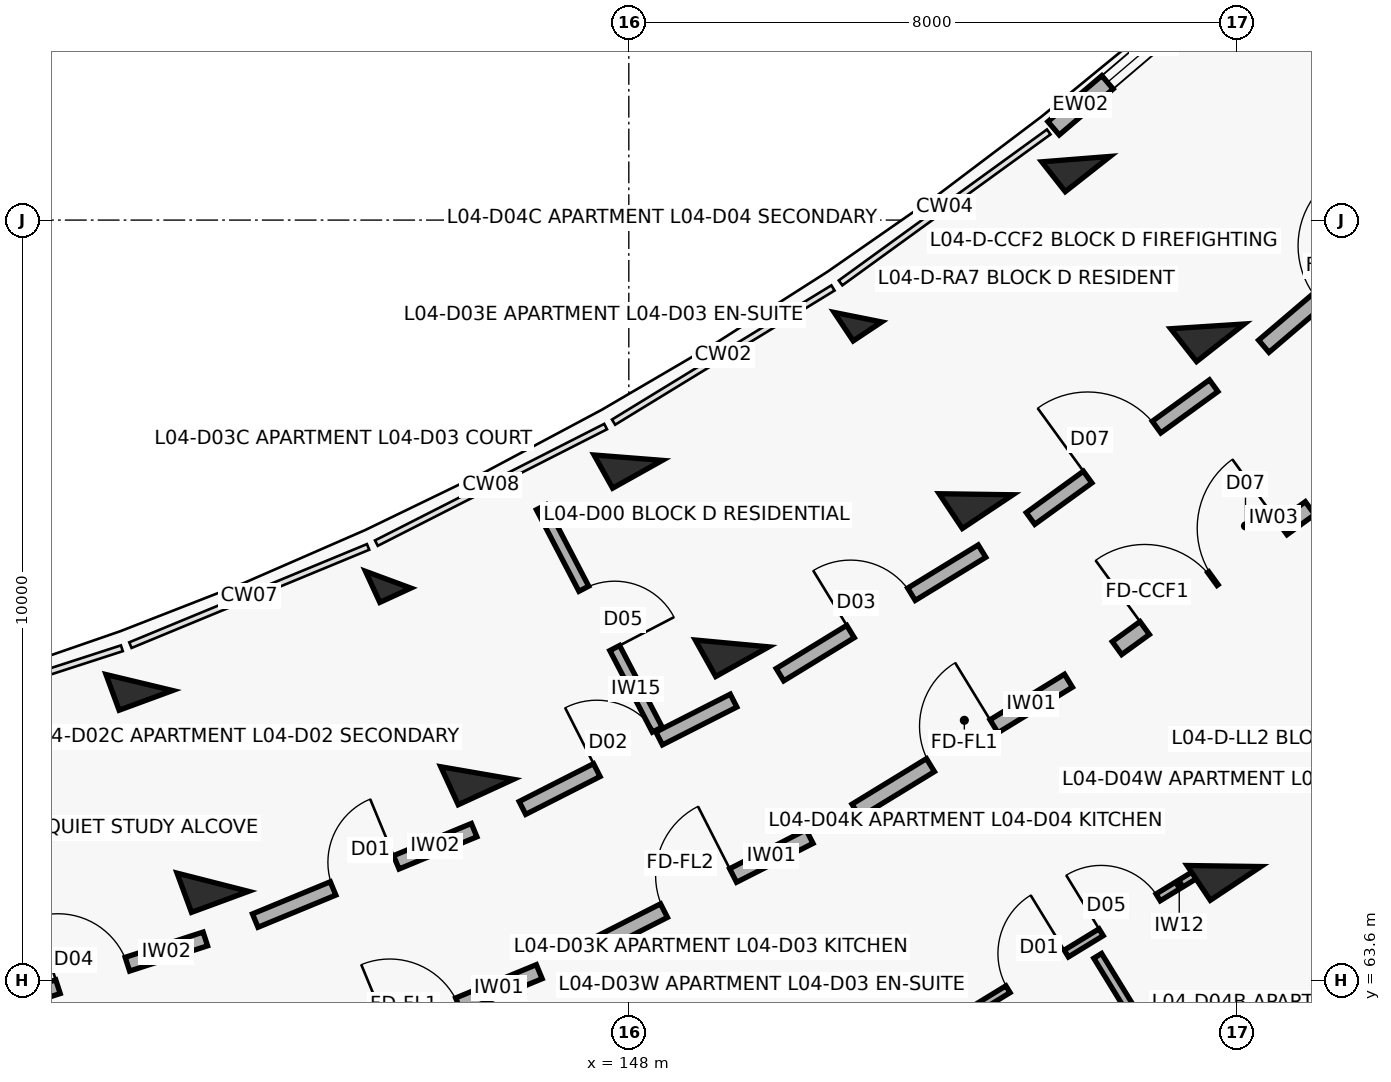
"""IFC4 building model, lengths in metres.
Left out: names, types, materials, properties, quantities, classifications, styles, units other than length and angle.
Written with IfcOpenShell. Run it as: python <this file> out.ifc"""

import sys

from ifc_helpers import new_model, si_unit, direction, frame, frame_2d, origin, origin_2d, place, context, subcontext, project, spatial, rectangle, extrude, element, fill, save


model = new_model("IFC4")
c1 = context("Model", 3, precision=1e-05, world=origin(), true_north=direction((0.0, 1.0)))
c2 = subcontext(c1, "Body", "Model", "MODEL_VIEW")
j1 = project(units=[si_unit("LENGTHUNIT", "METRE"), si_unit("PLANEANGLEUNIT", "RADIAN")], contexts=[c1])
p1 = place(None, origin())
s1 = spatial("IfcSite", under=j1, at=p1, CompositionType="ELEMENT")
p2 = place(p1, origin())
s2 = spatial("IfcBuilding", under=s1, at=p2, CompositionType="ELEMENT")
p3 = place(p2, frame((0.0, 0.0, 14.3)))
s3 = spatial("IfcBuildingStorey", under=s2, at=p3, CompositionType="ELEMENT", Elevation=14.3)
p4 = place(p3, frame((141.56, 67.515, 0.0), z_axis=(0.0, 0.0, 1.0), x_axis=(0.345298198999, -0.93849302276, 0.0)))
e1 = element("IfcColumn", 1, at=p4, inside=s3, PredefinedType="COLUMN", context=c2, shape_type="SweptSolid", body=[
    extrude(rectangle(XDim=0.5, YDim=0.75, at=origin_2d()), origin(), (0.0, 0.0, 1.0), 3.1),
])
p5 = place(p3, frame((142.527, 64.887, 0.0), z_axis=(0.0, 0.0, 1.0), x_axis=(0.345298198999, -0.93849302276, 0.0)))
e2 = element("IfcColumn", 2, at=p5, inside=s3, PredefinedType="COLUMN", context=c2, shape_type="SweptSolid", body=[
    extrude(rectangle(XDim=0.55, YDim=0.8, at=origin_2d()), origin(), (0.0, 0.0, 1.0), 3.1),
])
p6 = place(p3, frame((144.834, 68.868, 0.0), z_axis=(0.0, 0.0, 1.0), x_axis=(0.417867073801, -0.908508177527, 0.0)))
e3 = element("IfcColumn", 3, at=p6, inside=s3, PredefinedType="COLUMN", context=c2, shape_type="SweptSolid", body=[
    extrude(rectangle(XDim=0.45, YDim=0.45, at=origin_2d()), origin(), (0.0, 0.0, 1.0), 3.1),
])
p7 = place(p3, frame((146.004, 66.324, 0.0), z_axis=(0.0, 0.0, 1.0), x_axis=(0.417867073801, -0.908508177527, 0.0)))
e4 = element("IfcColumn", 4, at=p7, inside=s3, PredefinedType="COLUMN", context=c2, shape_type="SweptSolid", body=[
    extrude(rectangle(XDim=0.55, YDim=0.8, at=origin_2d()), origin(), (0.0, 0.0, 1.0), 3.1),
])
p8 = place(p3, frame((147.992, 70.474, 0.0), z_axis=(0.0, 0.0, 1.0), x_axis=(0.487859659139, -0.87292207727, 0.0)))
e5 = element("IfcColumn", 5, at=p8, inside=s3, PredefinedType="COLUMN", context=c2, shape_type="SweptSolid", body=[
    extrude(rectangle(XDim=0.5, YDim=0.75, at=origin_2d()), origin(), (0.0, 0.0, 1.0), 3.1),
])
for number, where, z_axis, x_axis in (
    (6, (149.358, 68.03, 0.0), (0.0, 0.0, 1.0), (0.488, -0.873, 0.0)),
    (7, (152.227, 62.897, 0.0), (0.0, 0.0, 1.0), (0.488, -0.873, 0.0)),
):
    element("IfcColumn", number, at=place(p3, frame(where, z_axis=z_axis, x_axis=x_axis)), inside=s3, PredefinedType="COLUMN", context=c2, shape_type="SweptSolid", body=[
        extrude(rectangle(XDim=0.55, YDim=0.8, at=origin_2d()), origin(), (0.0, 0.0, 1.0), 3.1),
    ])
p9 = place(p3, frame((151.015, 72.322, 0.0), z_axis=(0.0, 0.0, 1.0), x_axis=(0.554844427448, -0.83195412213, 0.0)))
e8 = element("IfcColumn", 8, at=p9, inside=s3, PredefinedType="COLUMN", context=c2, shape_type="SweptSolid", body=[
    extrude(rectangle(XDim=0.45, YDim=0.45, at=origin_2d()), origin(), (0.0, 0.0, 1.0), 3.1),
])
for number, where, z_axis, x_axis in (
    (9, (152.568, 69.993, 0.0), (0.0, 0.0, 1.0), (0.555, -0.832, 0.0)),
    (10, (155.831, 65.101, 0.0), (0.0, 0.0, 1.0), (0.555, -0.832, 0.0)),
):
    element("IfcColumn", number, at=place(p3, frame(where, z_axis=z_axis, x_axis=x_axis)), inside=s3, PredefinedType="COLUMN", context=c2, shape_type="SweptSolid", body=[
        extrude(rectangle(XDim=0.55, YDim=0.8, at=origin_2d()), origin(), (0.0, 0.0, 1.0), 3.1),
    ])
p10 = place(p3, frame((153.883, 74.402, 0.0), z_axis=(0.0, 0.0, 1.0), x_axis=(0.618408395358, -0.785856893175, 0.0)))
e11 = element("IfcColumn", 11, at=p10, inside=s3, PredefinedType="COLUMN", context=c2, shape_type="SweptSolid", body=[
    extrude(rectangle(XDim=0.5, YDim=0.75, at=origin_2d()), origin(), (0.0, 0.0, 1.0), 3.1),
])
p11 = place(p3, frame((155.614, 72.202, 0.0), z_axis=(0.0, 0.0, 1.0), x_axis=(0.618408395358, -0.785856893175, 0.0)))
e12 = element("IfcColumn", 12, at=p11, inside=s3, PredefinedType="COLUMN", context=c2, shape_type="SweptSolid", body=[
    extrude(rectangle(XDim=0.55, YDim=0.8, at=origin_2d()), origin(), (0.0, 0.0, 1.0), 3.1),
])
p12 = place(p3, frame((153.589, 74.808, 0.0), z_axis=(0.0, 0.0, 1.0), x_axis=(0.760985425115, 0.648768974876, 0.0)))
e13 = element("IfcWall", 13, at=p12, inside=s3, PredefinedType="SOLIDWALL", context=c2, shape_type="SweptSolid", body=[
    extrude(rectangle(XDim=3.464, YDim=0.23, at=frame_2d((1.732, 0.0))), origin(), (0.0, 0.0, 1.0), 2.25),
])
p13 = place(p12, frame((0.932, 0.0, 0.32)))
e14 = element("IfcOpeningElement", 14, at=p13, cuts=e13, PredefinedType="OPENING", context=c2, shape_type="SweptSolid", body=[
    extrude(rectangle(XDim=1.6, YDim=1.5, at=frame_2d((0.8, 0.75))), frame((0.0, 0.125, 0.0), z_axis=(0.0, -1.0, 0.0), x_axis=(1.0, 0.0, 0.0)), (0.0, 0.0, 1.0), 0.25),
])
p14 = place(p3, frame((139.464, 63.181, 0.0), z_axis=(0.0, 0.0, 1.0), x_axis=(0.951336474448, 0.308154040027, 0.0)))
e15 = element("IfcWall", 15, at=p14, inside=s3, PredefinedType="SOLIDWALL", context=c2, shape_type="SweptSolid", body=[
    extrude(rectangle(XDim=3.116, YDim=0.19, at=frame_2d((1.558, 0.0))), origin(), (0.0, 0.0, 1.0), 2.08),
])
p15 = place(p14, frame((1.078, 0.0, 0.0)))
e16 = element("IfcOpeningElement", 16, at=p15, cuts=e15, PredefinedType="OPENING", context=c2, shape_type="SweptSolid", body=[
    extrude(rectangle(XDim=0.96, YDim=2.1, at=frame_2d((0.48, 1.05))), frame((0.0, 0.105, 0.0), z_axis=(0.0, -1.0, 0.0), x_axis=(1.0, 0.0, 0.0)), (0.0, 0.0, 1.0), 0.21),
])
p16 = place(p3, frame((143.793, 62.459, 0.0), z_axis=(0.0, 0.0, 1.0), x_axis=(0.924214561665, 0.381873596896, 0.0)))
e17 = element("IfcWall", 17, at=p16, inside=s3, PredefinedType="SOLIDWALL", context=c2, shape_type="SweptSolid", body=[
    extrude(rectangle(XDim=3.277, YDim=0.2, at=frame_2d((1.639, 0.0))), origin(), (0.0, 0.0, 1.0), 2.08),
])
p17 = place(p16, frame((1.148, 0.0, 0.0)))
e18 = element("IfcOpeningElement", 18, at=p17, cuts=e17, PredefinedType="OPENING", context=c2, shape_type="SweptSolid", body=[
    extrude(rectangle(XDim=0.98, YDim=2.15, at=frame_2d((0.49, 1.075))), frame((0.0, 0.11, 0.0), z_axis=(0.0, -1.0, 0.0), x_axis=(1.0, 0.0, 0.0)), (0.0, 0.0, 1.0), 0.22),
])
p18 = place(p3, frame((143.085, 64.383, 0.0), z_axis=(0.0, 0.0, 1.0), x_axis=(0.924213340202, 0.381876553081, 0.0)))
e19 = element("IfcWall", 19, at=p18, inside=s3, PredefinedType="SOLIDWALL", context=c2, shape_type="SweptSolid", body=[
    extrude(rectangle(XDim=3.116, YDim=0.19, at=frame_2d((1.558, 0.0))), origin(), (0.0, 0.0, 1.0), 2.08),
])
p19 = place(p18, frame((1.108, 0.0, 0.0)))
e20 = element("IfcOpeningElement", 20, at=p19, cuts=e19, PredefinedType="OPENING", context=c2, shape_type="SweptSolid", body=[
    extrude(rectangle(XDim=0.9, YDim=2.1, at=frame_2d((0.45, 1.05))), frame((0.0, 0.105, 0.0), z_axis=(0.0, -1.0, 0.0), x_axis=(1.0, 0.0, 0.0)), (0.0, 0.0, 1.0), 0.21),
])
p20 = place(p3, frame((147.457, 64.003, 0.0), z_axis=(0.0, 0.0, 1.0), x_axis=(0.891412167565, 0.45319349898, 0.0)))
e21 = element("IfcWall", 21, at=p20, inside=s3, PredefinedType="SOLIDWALL", context=c2, shape_type="SweptSolid", body=[
    extrude(rectangle(XDim=3.277, YDim=0.2, at=frame_2d((1.639, 0.0))), origin(), (0.0, 0.0, 1.0), 2.08),
])
p21 = place(p20, frame((1.128, 0.0, 0.0)))
e22 = element("IfcOpeningElement", 22, at=p21, cuts=e21, PredefinedType="OPENING", context=c2, shape_type="SweptSolid", body=[
    extrude(rectangle(XDim=1.02, YDim=2.15, at=frame_2d((0.51, 1.075))), frame((0.0, 0.11, 0.0), z_axis=(0.0, -1.0, 0.0), x_axis=(1.0, 0.0, 0.0)), (0.0, 0.0, 1.0), 0.22),
])
p22 = place(p3, frame((146.6, 65.865, 0.0), z_axis=(0.0, 0.0, 1.0), x_axis=(0.891414101388, 0.453189695212, 0.0)))
e23 = element("IfcWall", 23, at=p22, inside=s3, PredefinedType="SOLIDWALL", context=c2, shape_type="SweptSolid", body=[
    extrude(rectangle(XDim=3.116, YDim=0.19, at=frame_2d((1.558, 0.0))), origin(), (0.0, 0.0, 1.0), 2.08),
])
p23 = place(p22, frame((1.098, 0.0, 0.0)))
e24 = element("IfcOpeningElement", 24, at=p23, cuts=e23, PredefinedType="OPENING", context=c2, shape_type="SweptSolid", body=[
    extrude(rectangle(XDim=0.92, YDim=2.1, at=frame_2d((0.46, 1.05))), frame((0.0, 0.105, 0.0), z_axis=(0.0, -1.0, 0.0), x_axis=(1.0, 0.0, 0.0)), (0.0, 0.0, 1.0), 0.21),
])
p24 = place(p3, frame((146.849, 69.822, 0.0), z_axis=(0.0, 0.0, 1.0), x_axis=(0.462242343884, -0.886753638572, 0.0)))
e25 = element("IfcWall", 25, at=p24, inside=s3, PredefinedType="PARTITIONING", context=c2, shape_type="SweptSolid", body=[
    extrude(rectangle(XDim=3.3, YDim=0.145, at=frame_2d((1.65, 0.0))), origin(), (0.0, 0.0, 1.0), 2.08),
])
p25 = place(p24, frame((1.21, 0.0, 0.0)))
e26 = element("IfcOpeningElement", 26, at=p25, cuts=e25, PredefinedType="OPENING", context=c2, shape_type="SweptSolid", body=[
    extrude(rectangle(XDim=0.88, YDim=2.1, at=frame_2d((0.44, 1.05))), frame((0.0, 0.083, 0.0), z_axis=(0.0, -1.0, 0.0), x_axis=(1.0, 0.0, 0.0)), (0.0, 0.0, 1.0), 0.165),
])
p26 = place(p3, frame((150.989, 65.829, 0.0), z_axis=(0.0, 0.0, 1.0), x_axis=(0.853090237845, 0.521763400492, 0.0)))
e27 = element("IfcWall", 27, at=p26, inside=s3, PredefinedType="SOLIDWALL", context=c2, shape_type="SweptSolid", body=[
    extrude(rectangle(XDim=3.277, YDim=0.2, at=frame_2d((1.638, 0.0))), origin(), (0.0, 0.0, 1.0), 2.08),
])
p27 = place(p26, frame((1.148, 0.0, 0.0)))
e28 = element("IfcOpeningElement", 28, at=p27, cuts=e27, PredefinedType="OPENING", context=c2, shape_type="SweptSolid", body=[
    extrude(rectangle(XDim=0.98, YDim=2.15, at=frame_2d((0.49, 1.075))), frame((0.0, 0.11, 0.0), z_axis=(0.0, -1.0, 0.0), x_axis=(1.0, 0.0, 0.0)), (0.0, 0.0, 1.0), 0.22),
])
p28 = place(p3, frame((149.989, 67.619, 0.0), z_axis=(0.0, 0.0, 1.0), x_axis=(0.853121049608, 0.5217130195, 0.0)))
e29 = element("IfcWall", 29, at=p28, inside=s3, PredefinedType="SOLIDWALL", context=c2, shape_type="SweptSolid", body=[
    extrude(rectangle(XDim=3.116, YDim=0.19, at=frame_2d((1.558, 0.0))), origin(), (0.0, 0.0, 1.0), 2.08),
])
p29 = place(p28, frame((1.088, 0.0, 0.0)))
e30 = element("IfcOpeningElement", 30, at=p29, cuts=e29, PredefinedType="OPENING", context=c2, shape_type="SweptSolid", body=[
    extrude(rectangle(XDim=0.94, YDim=2.1, at=frame_2d((0.47, 1.05))), frame((0.0, 0.105, 0.0), z_axis=(0.0, -1.0, 0.0), x_axis=(1.0, 0.0, 0.0)), (0.0, 0.0, 1.0), 0.21),
])
p30 = place(p3, frame((152.434, 63.141, 0.0), z_axis=(0.0, 0.0, 1.0), x_axis=(0.853089873067, 0.521763996909, 0.0)))
e31 = element("IfcWall", 31, at=p30, inside=s3, PredefinedType="PARTITIONING", context=c2, shape_type="SweptSolid", body=[
    extrude(rectangle(XDim=3.616, YDim=0.105, at=frame_2d((1.808, 0.0))), origin(), (0.0, 0.0, 1.0), 2.08),
])
p31 = place(p30, frame((0.65, 0.0, 0.0)))
e32 = element("IfcOpeningElement", 32, at=p31, cuts=e31, PredefinedType="OPENING", context=c2, shape_type="SweptSolid", body=[
    extrude(rectangle(XDim=0.9, YDim=2.1, at=frame_2d((0.45, 1.05))), frame((0.0, 0.062, 0.0), z_axis=(0.0, -1.0, 0.0), x_axis=(1.0, 0.0, 0.0)), (0.0, 0.0, 1.0), 0.125),
])
p32 = place(p30, frame((2.086, 0.0, 0.0)))
e33 = element("IfcOpeningElement", 33, at=p32, cuts=e31, PredefinedType="OPENING", context=c2, shape_type="SweptSolid", body=[
    extrude(rectangle(XDim=0.88, YDim=2.1, at=frame_2d((0.44, 1.05))), frame((0.0, 0.062, 0.0), z_axis=(0.0, -1.0, 0.0), x_axis=(1.0, 0.0, 0.0)), (0.0, 0.0, 1.0), 0.125),
])
p33 = place(p3, frame((154.169, 63.919, 0.0), z_axis=(0.0, 0.0, 1.0), x_axis=(0.522980301869, -0.852344768188, 0.0)))
e34 = element("IfcWall", 34, at=p33, inside=s3, PredefinedType="PARTITIONING", context=c2, shape_type="SweptSolid", body=[
    extrude(rectangle(XDim=5.05, YDim=0.12, at=frame_2d((2.525, 0.0))), origin(), (0.0, 0.0, 1.0), 2.08),
])
p34 = place(p33, frame((1.995, 0.0, 0.0)))
e35 = element("IfcOpeningElement", 35, at=p34, cuts=e34, PredefinedType="OPENING", context=c2, shape_type="SweptSolid", body=[
    extrude(rectangle(XDim=1.06, YDim=2.1, at=frame_2d((0.53, 1.05))), frame((0.0, 0.07, 0.0), z_axis=(0.0, -1.0, 0.0), x_axis=(1.0, 0.0, 0.0)), (0.0, 0.0, 1.0), 0.14),
])
p35 = place(p3, frame((154.423, 67.968, 0.0), z_axis=(0.0, 0.0, 1.0), x_axis=(0.809516127005, 0.587097641043, 0.0)))
e36 = element("IfcWall", 36, at=p35, inside=s3, PredefinedType="SOLIDWALL", context=c2, shape_type="SweptSolid", body=[
    extrude(rectangle(XDim=3.137, YDim=0.21, at=frame_2d((1.569, 0.0))), origin(), (0.0, 0.0, 1.0), 2.08),
])
p36 = place(p35, frame((0.45, 0.0, 0.0)))
e37 = element("IfcOpeningElement", 37, at=p36, cuts=e36, PredefinedType="OPENING", context=c2, shape_type="SweptSolid", body=[
    extrude(rectangle(XDim=1.1, YDim=2.15, at=frame_2d((0.55, 1.075))), frame((0.0, 0.115, 0.0), z_axis=(0.0, -1.0, 0.0), x_axis=(1.0, 0.0, 0.0)), (0.0, 0.0, 1.0), 0.23),
])
p37 = place(p35, frame((1.567, 0.0, 0.0)))
e38 = element("IfcOpeningElement", 38, at=p37, cuts=e36, PredefinedType="OPENING", context=c2, shape_type="SweptSolid", body=[
    extrude(rectangle(XDim=1.12, YDim=2.15, at=frame_2d((0.56, 1.075))), frame((0.0, 0.115, 0.0), z_axis=(0.0, -1.0, 0.0), x_axis=(1.0, 0.0, 0.0)), (0.0, 0.0, 1.0), 0.23),
])
p38 = place(p3, frame((153.285, 69.674, 0.0), z_axis=(0.0, 0.0, 1.0), x_axis=(0.809505174959, 0.587112741911, 0.0)))
e39 = element("IfcWall", 39, at=p38, inside=s3, PredefinedType="SOLIDWALL", context=c2, shape_type="SweptSolid", body=[
    extrude(rectangle(XDim=2.976, YDim=0.19, at=frame_2d((1.488, 0.0))), origin(), (0.0, 0.0, 1.0), 2.08),
])
p39 = place(p38, frame((0.928, 0.0, 0.0)))
e40 = element("IfcOpeningElement", 40, at=p39, cuts=e39, PredefinedType="OPENING", context=c2, shape_type="SweptSolid", body=[
    extrude(rectangle(XDim=1.12, YDim=2.15, at=frame_2d((0.56, 1.075))), frame((0.0, 0.105, 0.0), z_axis=(0.0, -1.0, 0.0), x_axis=(1.0, 0.0, 0.0)), (0.0, 0.0, 1.0), 0.21),
])
p40 = place(p3, frame((156.354, 71.94, 0.0), z_axis=(0.0, 0.0, 1.0), x_axis=(0.760991187621, 0.648762215579, 0.0)))
e41 = element("IfcWall", 41, at=p40, inside=s3, PredefinedType="SOLIDWALL", context=c2, shape_type="SweptSolid", body=[
    extrude(rectangle(XDim=2.976, YDim=0.21, at=frame_2d((1.488, 0.0))), origin(), (0.0, 0.0, 1.0), 2.08),
])
p41 = place(p40, frame((0.938, 0.0, 0.0)))
e42 = element("IfcOpeningElement", 42, at=p41, cuts=e41, PredefinedType="OPENING", context=c2, shape_type="SweptSolid", body=[
    extrude(rectangle(XDim=1.1, YDim=2.15, at=frame_2d((0.55, 1.075))), frame((0.0, 0.115, 0.0), z_axis=(0.0, -1.0, 0.0), x_axis=(1.0, 0.0, 0.0)), (0.0, 0.0, 1.0), 0.23),
])
p42 = place(p13, origin())
e43 = element("IfcWindow", 43, at=p42, inside=s3, PartitioningType="DOUBLE_PANEL_VERTICAL", PredefinedType="WINDOW", context=c2, shape_type="SweptSolid", body=[
    extrude(rectangle(XDim=1.6, YDim=1.5, at=frame_2d((0.8, 0.75))), frame((0.0, 0.03, 0.0), z_axis=(0.0, -1.0, 0.0), x_axis=(1.0, 0.0, 0.0)), (0.0, 0.0, 1.0), 0.06),
])
fill(e14, e43)
p43 = place(p15, origin())
e44 = element("IfcDoor", 44, at=p43, inside=s3, OperationType="SINGLE_SWING_LEFT", PredefinedType="DOOR", context=c2, shape_type="SweptSolid", body=[
    extrude(rectangle(XDim=0.96, YDim=2.1, at=frame_2d((0.48, 1.05))), frame((0.0, 0.025, 0.0), z_axis=(0.0, -1.0, 0.0), x_axis=(1.0, 0.0, 0.0)), (0.0, 0.0, 1.0), 0.05),
])
fill(e16, e44)
p44 = place(p19, origin())
e45 = element("IfcDoor", 45, at=p44, inside=s3, OperationType="SINGLE_SWING_RIGHT", PredefinedType="DOOR", context=c2, shape_type="SweptSolid", body=[
    extrude(rectangle(XDim=0.9, YDim=2.1, at=frame_2d((0.45, 1.05))), frame((0.0, 0.025, 0.0), z_axis=(0.0, -1.0, 0.0), x_axis=(1.0, 0.0, 0.0)), (0.0, 0.0, 1.0), 0.05),
])
fill(e20, e45)
p45 = place(p21, origin())
e46 = element("IfcDoor", 46, at=p45, inside=s3, OperationType="SINGLE_SWING_RIGHT", PredefinedType="DOOR", context=c2, shape_type="SweptSolid", body=[
    extrude(rectangle(XDim=1.02, YDim=2.15, at=frame_2d((0.51, 1.075))), frame((0.0, 0.025, 0.0), z_axis=(0.0, -1.0, 0.0), x_axis=(1.0, 0.0, 0.0)), (0.0, 0.0, 1.0), 0.05),
])
fill(e22, e46)
p46 = place(p23, origin())
e47 = element("IfcDoor", 47, at=p46, inside=s3, OperationType="SINGLE_SWING_LEFT", PredefinedType="DOOR", context=c2, shape_type="SweptSolid", body=[
    extrude(rectangle(XDim=0.92, YDim=2.1, at=frame_2d((0.46, 1.05))), frame((0.0, 0.025, 0.0), z_axis=(0.0, -1.0, 0.0), x_axis=(1.0, 0.0, 0.0)), (0.0, 0.0, 1.0), 0.05),
])
fill(e24, e47)
p47 = place(p25, origin())
e48 = element("IfcDoor", 48, at=p47, inside=s3, OperationType="SINGLE_SWING_RIGHT", PredefinedType="DOOR", context=c2, shape_type="SweptSolid", body=[
    extrude(rectangle(XDim=0.88, YDim=2.1, at=frame_2d((0.44, 1.05))), frame((0.0, 0.025, 0.0), z_axis=(0.0, -1.0, 0.0), x_axis=(1.0, 0.0, 0.0)), (0.0, 0.0, 1.0), 0.05),
])
fill(e26, e48)
p48 = place(p27, origin())
e49 = element("IfcDoor", 49, at=p48, inside=s3, OperationType="SINGLE_SWING_RIGHT", PredefinedType="DOOR", context=c2, shape_type="SweptSolid", body=[
    extrude(rectangle(XDim=0.98, YDim=2.15, at=frame_2d((0.49, 1.075))), frame((0.0, 0.025, 0.0), z_axis=(0.0, -1.0, 0.0), x_axis=(1.0, 0.0, 0.0)), (0.0, 0.0, 1.0), 0.05),
])
fill(e28, e49)
p49 = place(p29, origin())
e50 = element("IfcDoor", 50, at=p49, inside=s3, OperationType="SINGLE_SWING_LEFT", PredefinedType="DOOR", context=c2, shape_type="SweptSolid", body=[
    extrude(rectangle(XDim=0.94, YDim=2.1, at=frame_2d((0.47, 1.05))), frame((0.0, 0.025, 0.0), z_axis=(0.0, -1.0, 0.0), x_axis=(1.0, 0.0, 0.0)), (0.0, 0.0, 1.0), 0.05),
])
fill(e30, e50)
p50 = place(p31, origin())
e51 = element("IfcDoor", 51, at=p50, inside=s3, OperationType="SINGLE_SWING_RIGHT", PredefinedType="DOOR", context=c2, shape_type="SweptSolid", body=[
    extrude(rectangle(XDim=0.9, YDim=2.1, at=frame_2d((0.45, 1.05))), frame((0.0, 0.025, 0.0), z_axis=(0.0, -1.0, 0.0), x_axis=(1.0, 0.0, 0.0)), (0.0, 0.0, 1.0), 0.05),
])
fill(e32, e51)
p51 = place(p32, origin())
e52 = element("IfcDoor", 52, at=p51, inside=s3, OperationType="SINGLE_SWING_LEFT", PredefinedType="DOOR", context=c2, shape_type="SweptSolid", body=[
    extrude(rectangle(XDim=0.88, YDim=2.1, at=frame_2d((0.44, 1.05))), frame((0.0, 0.025, 0.0), z_axis=(0.0, -1.0, 0.0), x_axis=(1.0, 0.0, 0.0)), (0.0, 0.0, 1.0), 0.05),
])
fill(e33, e52)
p52 = place(p36, origin())
e53 = element("IfcDoor", 53, at=p52, inside=s3, OperationType="SINGLE_SWING_LEFT", PredefinedType="DOOR", context=c2, shape_type="SweptSolid", body=[
    extrude(rectangle(XDim=1.1, YDim=2.15, at=frame_2d((0.55, 1.075))), frame((0.0, 0.025, 0.0), z_axis=(0.0, -1.0, 0.0), x_axis=(1.0, 0.0, 0.0)), (0.0, 0.0, 1.0), 0.05),
])
fill(e37, e53)
p53 = place(p37, origin())
e54 = element("IfcDoor", 54, at=p53, inside=s3, OperationType="SINGLE_SWING_RIGHT", PredefinedType="DOOR", context=c2, shape_type="SweptSolid", body=[
    extrude(rectangle(XDim=1.12, YDim=2.15, at=frame_2d((0.56, 1.075))), frame((0.0, 0.025, 0.0), z_axis=(0.0, -1.0, 0.0), x_axis=(1.0, 0.0, 0.0)), (0.0, 0.0, 1.0), 0.05),
])
fill(e38, e54)
p54 = place(p39, origin())
e55 = element("IfcDoor", 55, at=p54, inside=s3, OperationType="SINGLE_SWING_LEFT", PredefinedType="DOOR", context=c2, shape_type="SweptSolid", body=[
    extrude(rectangle(XDim=1.12, YDim=2.15, at=frame_2d((0.56, 1.075))), frame((0.0, 0.025, 0.0), z_axis=(0.0, -1.0, 0.0), x_axis=(1.0, 0.0, 0.0)), (0.0, 0.0, 1.0), 0.05),
])
fill(e40, e55)
save(model, sys.argv[1])
